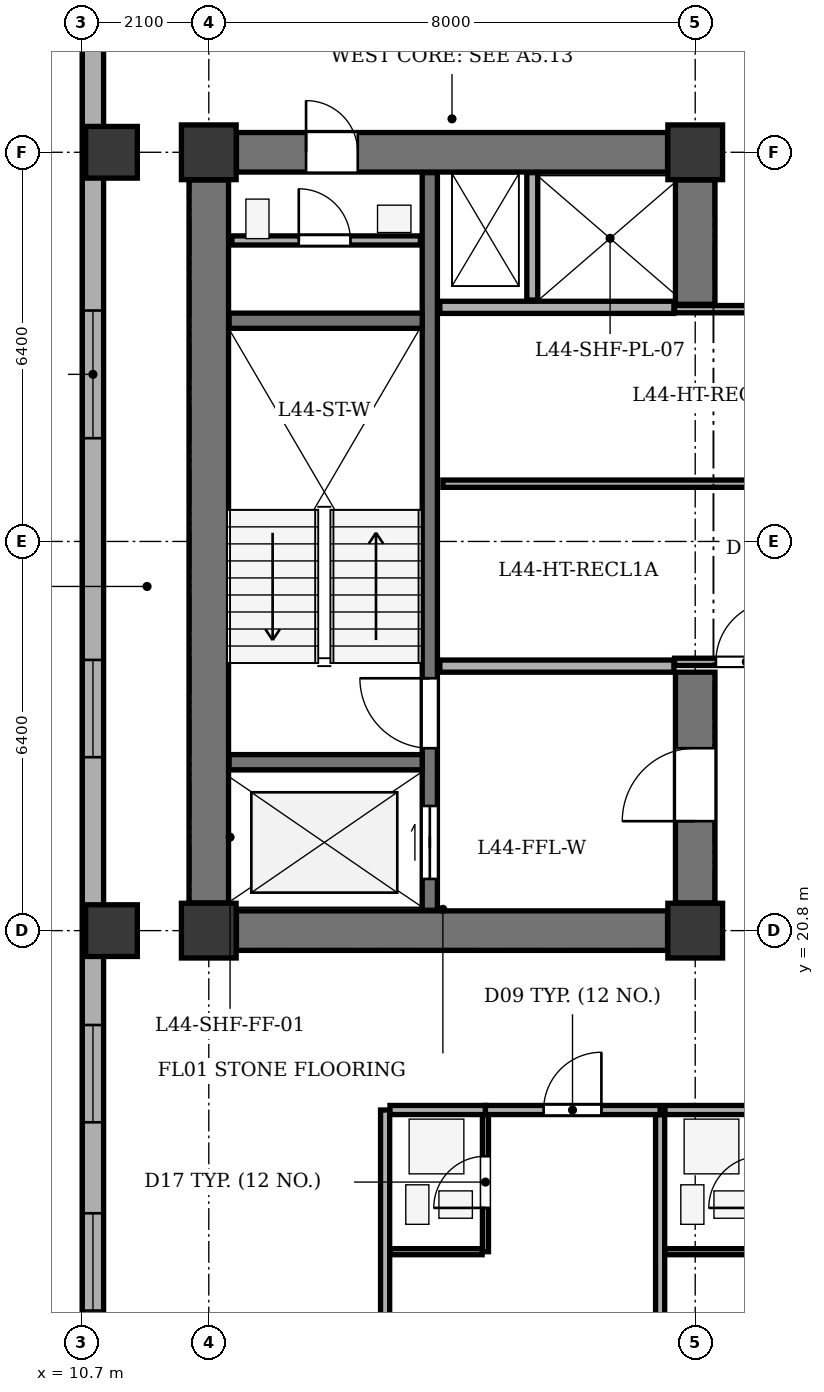
"""IFC4 building model, lengths in metres.
Left out: names, types, materials, properties, quantities, classifications, styles, units other than length and angle.
Written with IfcOpenShell. Run it as: python <this file> out.ifc"""

import sys

from ifc_helpers import new_model, si_unit, direction, frame, frame_2d, origin, origin_2d, place, context, subcontext, project, spatial, rectangle, extrude, element, fill, save


model = new_model("IFC4")
c1 = context("Model", 3, precision=1e-05, world=origin(), true_north=direction((0.0, 1.0)))
c2 = subcontext(c1, "Body", "Model", "MODEL_VIEW")
j1 = project(units=[si_unit("LENGTHUNIT", "METRE"), si_unit("PLANEANGLEUNIT", "RADIAN")], contexts=[c1])
p1 = place(None, origin())
s1 = spatial("IfcSite", under=j1, at=p1, CompositionType="ELEMENT")
p2 = place(p1, origin())
s2 = spatial("IfcBuilding", under=s1, at=p2, CompositionType="ELEMENT")
p3 = place(p2, frame((0.0, 0.0, 172.8)))
s3 = spatial("IfcBuildingStorey", under=s2, at=p3, CompositionType="ELEMENT", Elevation=172.8)
for number, where, z_axis, x_axis in (
    (1, (12.8, 20.8, 0.0), (0.0, 0.0, 1.0), (1.0, 0.0, 0.0)),
    (2, (20.8, 20.8, 0.0), (0.0, 0.0, 1.0), (1.0, 0.0, 0.0)),
    (3, (12.8, 33.6, 0.0), (0.0, 0.0, 1.0), (1.0, 0.0, 0.0)),
    (4, (20.8, 33.6, 0.0), (0.0, 0.0, 1.0), (1.0, 0.0, 0.0)),
):
    element("IfcColumn", number, at=place(p3, frame(where, z_axis=z_axis, x_axis=x_axis)), inside=s3, PredefinedType="COLUMN", context=c2, shape_type="SweptSolid", body=[
        extrude(rectangle(XDim=0.9, YDim=0.9, at=origin_2d()), origin(), (0.0, 0.0, 1.0), 3.5),
    ])
for number, where, z_axis, x_axis in (
    (5, (11.2, 20.8, 0.0), (0.0, 0.0, 1.0), (1.0, 0.0, 0.0)),
    (6, (11.2, 33.6, 0.0), (0.0, 0.0, 1.0), (1.0, 0.0, 0.0)),
):
    element("IfcColumn", number, at=place(p3, frame(where, z_axis=z_axis, x_axis=x_axis)), inside=s3, PredefinedType="COLUMN", context=c2, shape_type="SweptSolid", body=[
        extrude(rectangle(XDim=0.85, YDim=0.85, at=origin_2d()), origin(), (0.0, 0.0, 1.0), 3.5),
    ])
p4 = place(p3, frame((10.895, 12.9, 0.0), z_axis=(0.0, 0.0, 1.0), x_axis=(0.0, 1.0, 0.0)))
e7 = element("IfcWall", 7, at=p4, inside=s3, PredefinedType="STANDARD", context=c2, shape_type="SweptSolid", body=[
    extrude(rectangle(XDim=35.0, YDim=0.35, at=frame_2d((17.5, 0.0))), origin(), (0.0, 0.0, 1.0), 2.785),
])
p5 = place(p4, frame((1.652, 0.0, 0.75)))
e8 = element("IfcOpeningElement", 8, at=p5, cuts=e7, PredefinedType="OPENING", context=c2, shape_type="SweptSolid", body=[
    extrude(rectangle(XDim=1.6, YDim=1.75, at=frame_2d((0.8, 0.875))), frame((0.0, 0.185, 0.0), z_axis=(0.0, -1.0, 0.0), x_axis=(1.0, 0.0, 0.0)), (0.0, 0.0, 1.0), 0.37),
])
p6 = place(p4, frame((4.748, 0.0, 0.75)))
e9 = element("IfcOpeningElement", 9, at=p6, cuts=e7, PredefinedType="OPENING", context=c2, shape_type="SweptSolid", body=[
    extrude(rectangle(XDim=1.6, YDim=1.75, at=frame_2d((0.8, 0.875))), frame((0.0, 0.185, 0.0), z_axis=(0.0, -1.0, 0.0), x_axis=(1.0, 0.0, 0.0)), (0.0, 0.0, 1.0), 0.37),
])
p7 = place(p4, frame((10.752, 0.0, 0.75)))
e10 = element("IfcOpeningElement", 10, at=p7, cuts=e7, PredefinedType="OPENING", context=c2, shape_type="SweptSolid", body=[
    extrude(rectangle(XDim=1.6, YDim=1.75, at=frame_2d((0.8, 0.875))), frame((0.0, 0.185, 0.0), z_axis=(0.0, -1.0, 0.0), x_axis=(1.0, 0.0, 0.0)), (0.0, 0.0, 1.0), 0.37),
])
p8 = place(p4, frame((15.998, 0.0, 0.75)))
e11 = element("IfcOpeningElement", 11, at=p8, cuts=e7, PredefinedType="OPENING", context=c2, shape_type="SweptSolid", body=[
    extrude(rectangle(XDim=2.1, YDim=1.75, at=frame_2d((1.05, 0.875))), frame((0.0, 0.185, 0.0), z_axis=(0.0, -1.0, 0.0), x_axis=(1.0, 0.0, 0.0)), (0.0, 0.0, 1.0), 0.37),
])
p9 = place(p4, frame((23.916, 0.0, 0.75)))
e12 = element("IfcOpeningElement", 12, at=p9, cuts=e7, PredefinedType="OPENING", context=c2, shape_type="SweptSolid", body=[
    extrude(rectangle(XDim=1.6, YDim=1.75, at=frame_2d((0.8, 0.875))), frame((0.0, 0.185, 0.0), z_axis=(0.0, -1.0, 0.0), x_axis=(1.0, 0.0, 0.0)), (0.0, 0.0, 1.0), 0.37),
])
p10 = place(p4, frame((29.834, 0.0, 0.75)))
e13 = element("IfcOpeningElement", 13, at=p10, cuts=e7, PredefinedType="OPENING", context=c2, shape_type="SweptSolid", body=[
    extrude(rectangle(XDim=2.1, YDim=1.75, at=frame_2d((1.05, 0.875))), frame((0.0, 0.185, 0.0), z_axis=(0.0, -1.0, 0.0), x_axis=(1.0, 0.0, 0.0)), (0.0, 0.0, 1.0), 0.37),
])
p11 = place(p3, frame((12.8, 21.255, 0.0), z_axis=(0.0, 0.0, 1.0), x_axis=(0.0, 1.0, 0.0)))
e14 = element("IfcWall", 14, at=p11, inside=s3, PredefinedType="SHEAR", context=c2, shape_type="SweptSolid", body=[
    extrude(rectangle(XDim=11.89, YDim=0.65, at=frame_2d((5.945, 0.0))), origin(), (0.0, 0.0, 1.0), 3.2),
])
p12 = place(p3, frame((13.255, 20.8, 0.0), z_axis=(0.0, 0.0, 1.0), x_axis=(1.0, 0.0, 0.0)))
e15 = element("IfcWall", 15, at=p12, inside=s3, PredefinedType="SHEAR", context=c2, shape_type="SweptSolid", body=[
    extrude(rectangle(XDim=7.09, YDim=0.65, at=frame_2d((3.545, 0.0))), origin(), (0.0, 0.0, 1.0), 3.2),
])
p13 = place(p3, frame((13.255, 33.6, 0.0), z_axis=(0.0, 0.0, 1.0), x_axis=(1.0, 0.0, 0.0)))
e16 = element("IfcWall", 16, at=p13, inside=s3, PredefinedType="SHEAR", context=c2, shape_type="SweptSolid", body=[
    extrude(rectangle(XDim=7.09, YDim=0.65, at=frame_2d((3.545, 0.0))), origin(), (0.0, 0.0, 1.0), 3.2),
])
p14 = place(p13, frame((1.145, 0.0, 0.0)))
e17 = element("IfcOpeningElement", 17, at=p14, cuts=e16, PredefinedType="OPENING", context=c2, shape_type="SweptSolid", body=[
    extrude(rectangle(XDim=0.85, YDim=2.02, at=frame_2d((0.425, 1.01))), frame((0.0, 0.335, 0.0), z_axis=(0.0, -1.0, 0.0), x_axis=(1.0, 0.0, 0.0)), (0.0, 0.0, 1.0), 0.67),
])
p15 = place(p3, frame((20.8, 21.255, 0.0), z_axis=(0.0, 0.0, 1.0), x_axis=(0.0, 1.0, 0.0)))
e18 = element("IfcWall", 18, at=p15, inside=s3, PredefinedType="SHEAR", context=c2, shape_type="SweptSolid", body=[
    extrude(rectangle(XDim=3.795, YDim=0.65, at=frame_2d((1.897, 0.0))), origin(), (0.0, 0.0, 1.0), 3.2),
])
p16 = place(p15, frame((1.345, 0.0, 0.0)))
e19 = element("IfcOpeningElement", 19, at=p16, cuts=e18, PredefinedType="OPENING", context=c2, shape_type="SweptSolid", body=[
    extrude(rectangle(XDim=1.2, YDim=2.15, at=frame_2d((0.6, 1.075))), frame((0.0, 0.335, 0.0), z_axis=(0.0, -1.0, 0.0), x_axis=(1.0, 0.0, 0.0)), (0.0, 0.0, 1.0), 0.67),
])
p17 = place(p3, frame((20.8, 31.1, 0.0), z_axis=(0.0, 0.0, 1.0), x_axis=(0.0, 1.0, 0.0)))
e20 = element("IfcWall", 20, at=p17, inside=s3, PredefinedType="SHEAR", context=c2, shape_type="SweptSolid", body=[
    extrude(rectangle(XDim=2.045, YDim=0.65, at=frame_2d((1.022, 0.0))), origin(), (0.0, 0.0, 1.0), 3.2),
])
p18 = place(p3, frame((16.435, 21.135, 0.0), z_axis=(0.0, 0.0, 1.0), x_axis=(0.0, 1.0, 0.0)))
e21 = element("IfcWall", 21, at=p18, inside=s3, PredefinedType="SHEAR", context=c2, shape_type="SweptSolid", body=[
    extrude(rectangle(XDim=12.13, YDim=0.25, at=frame_2d((6.065, 0.0))), origin(), (0.0, 0.0, 1.0), 3.2),
])
p19 = place(p18, frame((0.515, 0.0, 0.0)))
e22 = element("IfcOpeningElement", 22, at=p19, cuts=e21, PredefinedType="OPENING", context=c2, shape_type="SweptSolid", body=[
    extrude(rectangle(XDim=1.2, YDim=2.15, at=frame_2d((0.6, 1.075))), frame((0.0, 0.135, 0.0), z_axis=(0.0, -1.0, 0.0), x_axis=(1.0, 0.0, 0.0)), (0.0, 0.0, 1.0), 0.27),
])
p20 = place(p18, frame((2.665, 0.0, 0.0)))
e23 = element("IfcOpeningElement", 23, at=p20, cuts=e21, PredefinedType="OPENING", context=c2, shape_type="SweptSolid", body=[
    extrude(rectangle(XDim=1.15, YDim=2.15, at=frame_2d((0.575, 1.075))), frame((0.0, 0.135, 0.0), z_axis=(0.0, -1.0, 0.0), x_axis=(1.0, 0.0, 0.0)), (0.0, 0.0, 1.0), 0.27),
])
for number, where, z_axis, x_axis in (
    (24, (13.135, 23.57, 0.0), (0.0, 0.0, 1.0), (1.0, 0.0, 0.0)),
    (25, (13.135, 30.83, 0.0), (0.0, 0.0, 1.0), (1.0, 0.0, 0.0)),
):
    element("IfcWall", number, at=place(p3, frame(where, z_axis=z_axis, x_axis=x_axis)), inside=s3, PredefinedType="SHEAR", context=c2, shape_type="SweptSolid", body=[
        extrude(rectangle(XDim=3.175, YDim=0.25, at=frame_2d((1.587, 0.0))), origin(), (0.0, 0.0, 1.0), 3.2),
    ])
for number, where, z_axis, x_axis in (
    (26, (16.6, 25.15, 0.0), (0.0, 0.0, 1.0), (1.0, 0.0, 0.0)),
    (27, (16.6, 31.05, 0.0), (0.0, 0.0, 1.0), (1.0, 0.0, 0.0)),
):
    element("IfcWall", number, at=place(p3, frame(where, z_axis=z_axis, x_axis=x_axis)), inside=s3, PredefinedType="SOLIDWALL", context=c2, shape_type="SweptSolid", body=[
        extrude(rectangle(XDim=3.85, YDim=0.2, at=frame_2d((1.925, 0.0))), origin(), (0.0, 0.0, 1.0), 3.2),
    ])
p21 = place(p3, frame((18.12, 31.17, 0.0), z_axis=(0.0, 0.0, 1.0), x_axis=(0.0, 1.0, 0.0)))
e28 = element("IfcWall", 28, at=p21, inside=s3, PredefinedType="PARTITIONING", context=c2, shape_type="SweptSolid", body=[
    extrude(rectangle(XDim=2.095, YDim=0.18, at=frame_2d((1.047, 0.0))), origin(), (0.0, 0.0, 1.0), 3.2),
])
p22 = place(p3, frame((13.18, 32.15, 0.0), z_axis=(0.0, 0.0, 1.0), x_axis=(1.0, 0.0, 0.0)))
e29 = element("IfcWall", 29, at=p22, inside=s3, PredefinedType="PARTITIONING", context=c2, shape_type="SweptSolid", body=[
    extrude(rectangle(XDim=3.1, YDim=0.15, at=frame_2d((1.55, 0.0))), origin(), (0.0, 0.0, 1.0), 3.2),
])
p23 = place(p22, frame((1.1, 0.0, 0.0)))
e30 = element("IfcOpeningElement", 30, at=p23, cuts=e29, PredefinedType="OPENING", context=c2, shape_type="SweptSolid", body=[
    extrude(rectangle(XDim=0.85, YDim=2.02, at=frame_2d((0.425, 1.01))), frame((0.0, 0.085, 0.0), z_axis=(0.0, -1.0, 0.0), x_axis=(1.0, 0.0, 0.0)), (0.0, 0.0, 1.0), 0.17),
])
p24 = place(p3, frame((20.46, 25.22, 0.0), z_axis=(0.0, 0.0, 1.0), x_axis=(1.0, 0.0, 0.0)))
e31 = element("IfcWall", 31, at=p24, inside=s3, PredefinedType="PARTITIONING", context=c2, shape_type="SweptSolid", body=[
    extrude(rectangle(XDim=11.94, YDim=0.12, at=frame_2d((5.97, 0.0))), origin(), (0.0, 0.0, 1.0), 3.2),
])
p25 = place(p24, frame((0.68, 0.0, 0.0)))
e32 = element("IfcOpeningElement", 32, at=p25, cuts=e31, PredefinedType="OPENING", context=c2, shape_type="SweptSolid", body=[
    extrude(rectangle(XDim=1.0, YDim=2.1, at=frame_2d((0.5, 1.05))), frame((0.0, 0.07, 0.0), z_axis=(0.0, -1.0, 0.0), x_axis=(1.0, 0.0, 0.0)), (0.0, 0.0, 1.0), 0.14),
])
p26 = place(p3, frame((20.46, 31.02, 0.0), z_axis=(0.0, 0.0, 1.0), x_axis=(1.0, 0.0, 0.0)))
e33 = element("IfcWall", 33, at=p26, inside=s3, PredefinedType="PARTITIONING", context=c2, shape_type="SweptSolid", body=[
    extrude(rectangle(XDim=11.94, YDim=0.12, at=frame_2d((5.97, 0.0))), origin(), (0.0, 0.0, 1.0), 3.2),
])
p27 = place(p3, frame((16.65, 28.15, 0.0), z_axis=(0.0, 0.0, 1.0), x_axis=(1.0, 0.0, 0.0)))
e34 = element("IfcWall", 34, at=p27, inside=s3, PredefinedType="PARTITIONING", context=c2, shape_type="SweptSolid", body=[
    extrude(rectangle(XDim=8.885, YDim=0.12, at=frame_2d((4.442, 0.0))), origin(), (0.0, 0.0, 1.0), 3.2),
])
p28 = place(p3, frame((15.7, 8.275, 0.0), z_axis=(0.0, 0.0, 1.0), x_axis=(0.0, 1.0, 0.0)))
e35 = element("IfcWall", 35, at=p28, inside=s3, PredefinedType="PARTITIONING", context=c2, shape_type="SweptSolid", body=[
    extrude(rectangle(XDim=9.575, YDim=0.15, at=frame_2d((4.788, 0.0))), origin(), (0.0, 0.0, 1.0), 3.2),
])
p29 = place(p3, frame((15.78, 17.85, 0.0), z_axis=(0.0, 0.0, 1.0), x_axis=(1.0, 0.0, 0.0)))
e36 = element("IfcWall", 36, at=p29, inside=s3, PredefinedType="PARTITIONING", context=c2, shape_type="SweptSolid", body=[
    extrude(rectangle(XDim=1.57, YDim=0.15, at=frame_2d((0.785, 0.0))), origin(), (0.0, 0.0, 1.0), 3.2),
])
p30 = place(p3, frame((17.35, 17.85, 0.0), z_axis=(0.0, 0.0, 1.0), x_axis=(1.0, 0.0, 0.0)))
e37 = element("IfcWall", 37, at=p30, inside=s3, PredefinedType="PARTITIONING", context=c2, shape_type="SweptSolid", body=[
    extrude(rectangle(XDim=2.873, YDim=0.15, at=frame_2d((1.437, 0.0))), origin(), (0.0, 0.0, 1.0), 3.2),
])
p31 = place(p30, frame((0.957, 0.0, 0.0)))
e38 = element("IfcOpeningElement", 38, at=p31, cuts=e37, PredefinedType="OPENING", context=c2, shape_type="SweptSolid", body=[
    extrude(rectangle(XDim=0.95, YDim=2.1, at=frame_2d((0.475, 1.05))), frame((0.0, 0.085, 0.0), z_axis=(0.0, -1.0, 0.0), x_axis=(1.0, 0.0, 0.0)), (0.0, 0.0, 1.0), 0.17),
])
p32 = place(p3, frame((17.35, 15.52, 0.0), z_axis=(0.0, 0.0, 1.0), x_axis=(0.0, 1.0, 0.0)))
e39 = element("IfcWall", 39, at=p32, inside=s3, PredefinedType="PARTITIONING", context=c2, shape_type="SweptSolid", body=[
    extrude(rectangle(XDim=2.25, YDim=0.1, at=frame_2d((1.125, 0.0))), origin(), (0.0, 0.0, 1.0), 3.2),
])
p33 = place(p32, frame((0.72, 0.0, 0.0)))
e40 = element("IfcOpeningElement", 40, at=p33, cuts=e39, PredefinedType="OPENING", context=c2, shape_type="SweptSolid", body=[
    extrude(rectangle(XDim=0.85, YDim=2.05, at=frame_2d((0.425, 1.025))), frame((0.0, 0.06, 0.0), z_axis=(0.0, -1.0, 0.0), x_axis=(1.0, 0.0, 0.0)), (0.0, 0.0, 1.0), 0.12),
])
p34 = place(p3, frame((15.78, 15.52, 0.0), z_axis=(0.0, 0.0, 1.0), x_axis=(1.0, 0.0, 0.0)))
e41 = element("IfcWall", 41, at=p34, inside=s3, PredefinedType="PARTITIONING", context=c2, shape_type="SweptSolid", body=[
    extrude(rectangle(XDim=1.515, YDim=0.1, at=frame_2d((0.757, 0.0))), origin(), (0.0, 0.0, 1.0), 3.2),
])
p35 = place(p3, frame((20.223, 8.275, 0.0), z_axis=(0.0, 0.0, 1.0), x_axis=(0.0, 1.0, 0.0)))
e42 = element("IfcWall", 42, at=p35, inside=s3, PredefinedType="PARTITIONING", context=c2, shape_type="SweptSolid", body=[
    extrude(rectangle(XDim=9.495, YDim=0.15, at=frame_2d((4.748, 0.0))), origin(), (0.0, 0.0, 1.0), 3.2),
])
p36 = place(p3, frame((20.303, 17.85, 0.0), z_axis=(0.0, 0.0, 1.0), x_axis=(1.0, 0.0, 0.0)))
e43 = element("IfcWall", 43, at=p36, inside=s3, PredefinedType="PARTITIONING", context=c2, shape_type="SweptSolid", body=[
    extrude(rectangle(XDim=1.57, YDim=0.15, at=frame_2d((0.785, 0.0))), origin(), (0.0, 0.0, 1.0), 3.2),
])
p37 = place(p3, frame((20.303, 15.52, 0.0), z_axis=(0.0, 0.0, 1.0), x_axis=(1.0, 0.0, 0.0)))
e44 = element("IfcWall", 44, at=p37, inside=s3, PredefinedType="PARTITIONING", context=c2, shape_type="SweptSolid", body=[
    extrude(rectangle(XDim=1.515, YDim=0.1, at=frame_2d((0.758, 0.0))), origin(), (0.0, 0.0, 1.0), 3.2),
])
p38 = place(p5, origin())
e45 = element("IfcWindow", 45, at=p38, inside=s3, PartitioningType="SINGLE_PANEL", PredefinedType="WINDOW", context=c2, shape_type="SweptSolid", body=[
    extrude(rectangle(XDim=1.6, YDim=1.75, at=frame_2d((0.8, 0.875))), frame((0.0, -0.01, 0.0), z_axis=(0.0, -1.0, 0.0), x_axis=(1.0, 0.0, 0.0)), (0.0, 0.0, 1.0), 0.06),
])
fill(e8, e45)
p39 = place(p6, origin())
e46 = element("IfcWindow", 46, at=p39, inside=s3, PartitioningType="SINGLE_PANEL", PredefinedType="WINDOW", context=c2, shape_type="SweptSolid", body=[
    extrude(rectangle(XDim=1.6, YDim=1.75, at=frame_2d((0.8, 0.875))), frame((0.0, -0.01, 0.0), z_axis=(0.0, -1.0, 0.0), x_axis=(1.0, 0.0, 0.0)), (0.0, 0.0, 1.0), 0.06),
])
fill(e9, e46)
p40 = place(p7, origin())
e47 = element("IfcWindow", 47, at=p40, inside=s3, PartitioningType="SINGLE_PANEL", PredefinedType="WINDOW", context=c2, shape_type="SweptSolid", body=[
    extrude(rectangle(XDim=1.6, YDim=1.75, at=frame_2d((0.8, 0.875))), frame((0.0, -0.01, 0.0), z_axis=(0.0, -1.0, 0.0), x_axis=(1.0, 0.0, 0.0)), (0.0, 0.0, 1.0), 0.06),
])
fill(e10, e47)
p41 = place(p8, origin())
e48 = element("IfcWindow", 48, at=p41, inside=s3, PartitioningType="SINGLE_PANEL", PredefinedType="WINDOW", context=c2, shape_type="SweptSolid", body=[
    extrude(rectangle(XDim=2.1, YDim=1.75, at=frame_2d((1.05, 0.875))), frame((0.0, -0.01, 0.0), z_axis=(0.0, -1.0, 0.0), x_axis=(1.0, 0.0, 0.0)), (0.0, 0.0, 1.0), 0.06),
])
fill(e11, e48)
p42 = place(p14, origin())
e49 = element("IfcDoor", 49, at=p42, inside=s3, OperationType="SINGLE_SWING_LEFT", PredefinedType="DOOR", context=c2, shape_type="SweptSolid", body=[
    extrude(rectangle(XDim=0.85, YDim=2.02, at=frame_2d((0.425, 1.01))), frame((0.0, 0.025, 0.0), z_axis=(0.0, -1.0, 0.0), x_axis=(1.0, 0.0, 0.0)), (0.0, 0.0, 1.0), 0.05),
])
fill(e17, e49)
p43 = place(p16, origin())
e50 = element("IfcDoor", 50, at=p43, inside=s3, OperationType="SINGLE_SWING_LEFT", PredefinedType="DOOR", context=c2, shape_type="SweptSolid", body=[
    extrude(rectangle(XDim=1.2, YDim=2.15, at=frame_2d((0.6, 1.075))), frame((0.0, 0.025, 0.0), z_axis=(0.0, -1.0, 0.0), x_axis=(1.0, 0.0, 0.0)), (0.0, 0.0, 1.0), 0.05),
])
fill(e19, e50)
p44 = place(p19, origin())
e51 = element("IfcDoor", 51, at=p44, inside=s3, OperationType="DOUBLE_DOOR_SLIDING", PredefinedType="DOOR", context=c2, shape_type="SweptSolid", body=[
    extrude(rectangle(XDim=1.2, YDim=2.15, at=frame_2d((0.6, 1.075))), frame((0.0, 0.025, 0.0), z_axis=(0.0, -1.0, 0.0), x_axis=(1.0, 0.0, 0.0)), (0.0, 0.0, 1.0), 0.05),
])
fill(e22, e51)
p45 = place(p20, origin())
e52 = element("IfcDoor", 52, at=p45, inside=s3, OperationType="SINGLE_SWING_RIGHT", PredefinedType="DOOR", context=c2, shape_type="SweptSolid", body=[
    extrude(rectangle(XDim=1.15, YDim=2.15, at=frame_2d((0.575, 1.075))), frame((0.0, 0.025, 0.0), z_axis=(0.0, -1.0, 0.0), x_axis=(1.0, 0.0, 0.0)), (0.0, 0.0, 1.0), 0.05),
])
fill(e23, e52)
p46 = place(p23, origin())
e53 = element("IfcDoor", 53, at=p46, inside=s3, OperationType="SINGLE_SWING_LEFT", PredefinedType="DOOR", context=c2, shape_type="SweptSolid", body=[
    extrude(rectangle(XDim=0.85, YDim=2.02, at=frame_2d((0.425, 1.01))), frame((0.0, 0.025, 0.0), z_axis=(0.0, -1.0, 0.0), x_axis=(1.0, 0.0, 0.0)), (0.0, 0.0, 1.0), 0.05),
])
fill(e30, e53)
p47 = place(p25, origin())
e54 = element("IfcDoor", 54, at=p47, inside=s3, OperationType="SINGLE_SWING_RIGHT", PredefinedType="DOOR", context=c2, shape_type="SweptSolid", body=[
    extrude(rectangle(XDim=1.0, YDim=2.1, at=frame_2d((0.5, 1.05))), frame((0.0, 0.025, 0.0), z_axis=(0.0, -1.0, 0.0), x_axis=(1.0, 0.0, 0.0)), (0.0, 0.0, 1.0), 0.05),
])
fill(e32, e54)
p48 = place(p33, origin())
e55 = element("IfcDoor", 55, at=p48, inside=s3, OperationType="SINGLE_SWING_LEFT", PredefinedType="DOOR", context=c2, shape_type="SweptSolid", body=[
    extrude(rectangle(XDim=0.85, YDim=2.05, at=frame_2d((0.425, 1.025))), frame((0.0, 0.025, 0.0), z_axis=(0.0, -1.0, 0.0), x_axis=(1.0, 0.0, 0.0)), (0.0, 0.0, 1.0), 0.05),
])
fill(e40, e55)
p49 = place(p31, origin())
e56 = element("IfcDoor", 56, at=p49, inside=s3, OperationType="SINGLE_SWING_RIGHT", PredefinedType="DOOR", context=c2, shape_type="SweptSolid", body=[
    extrude(rectangle(XDim=0.95, YDim=2.1, at=frame_2d((0.475, 1.05))), frame((0.0, 0.025, 0.0), z_axis=(0.0, -1.0, 0.0), x_axis=(1.0, 0.0, 0.0)), (0.0, 0.0, 1.0), 0.05),
])
fill(e38, e56)
save(model, sys.argv[1])
